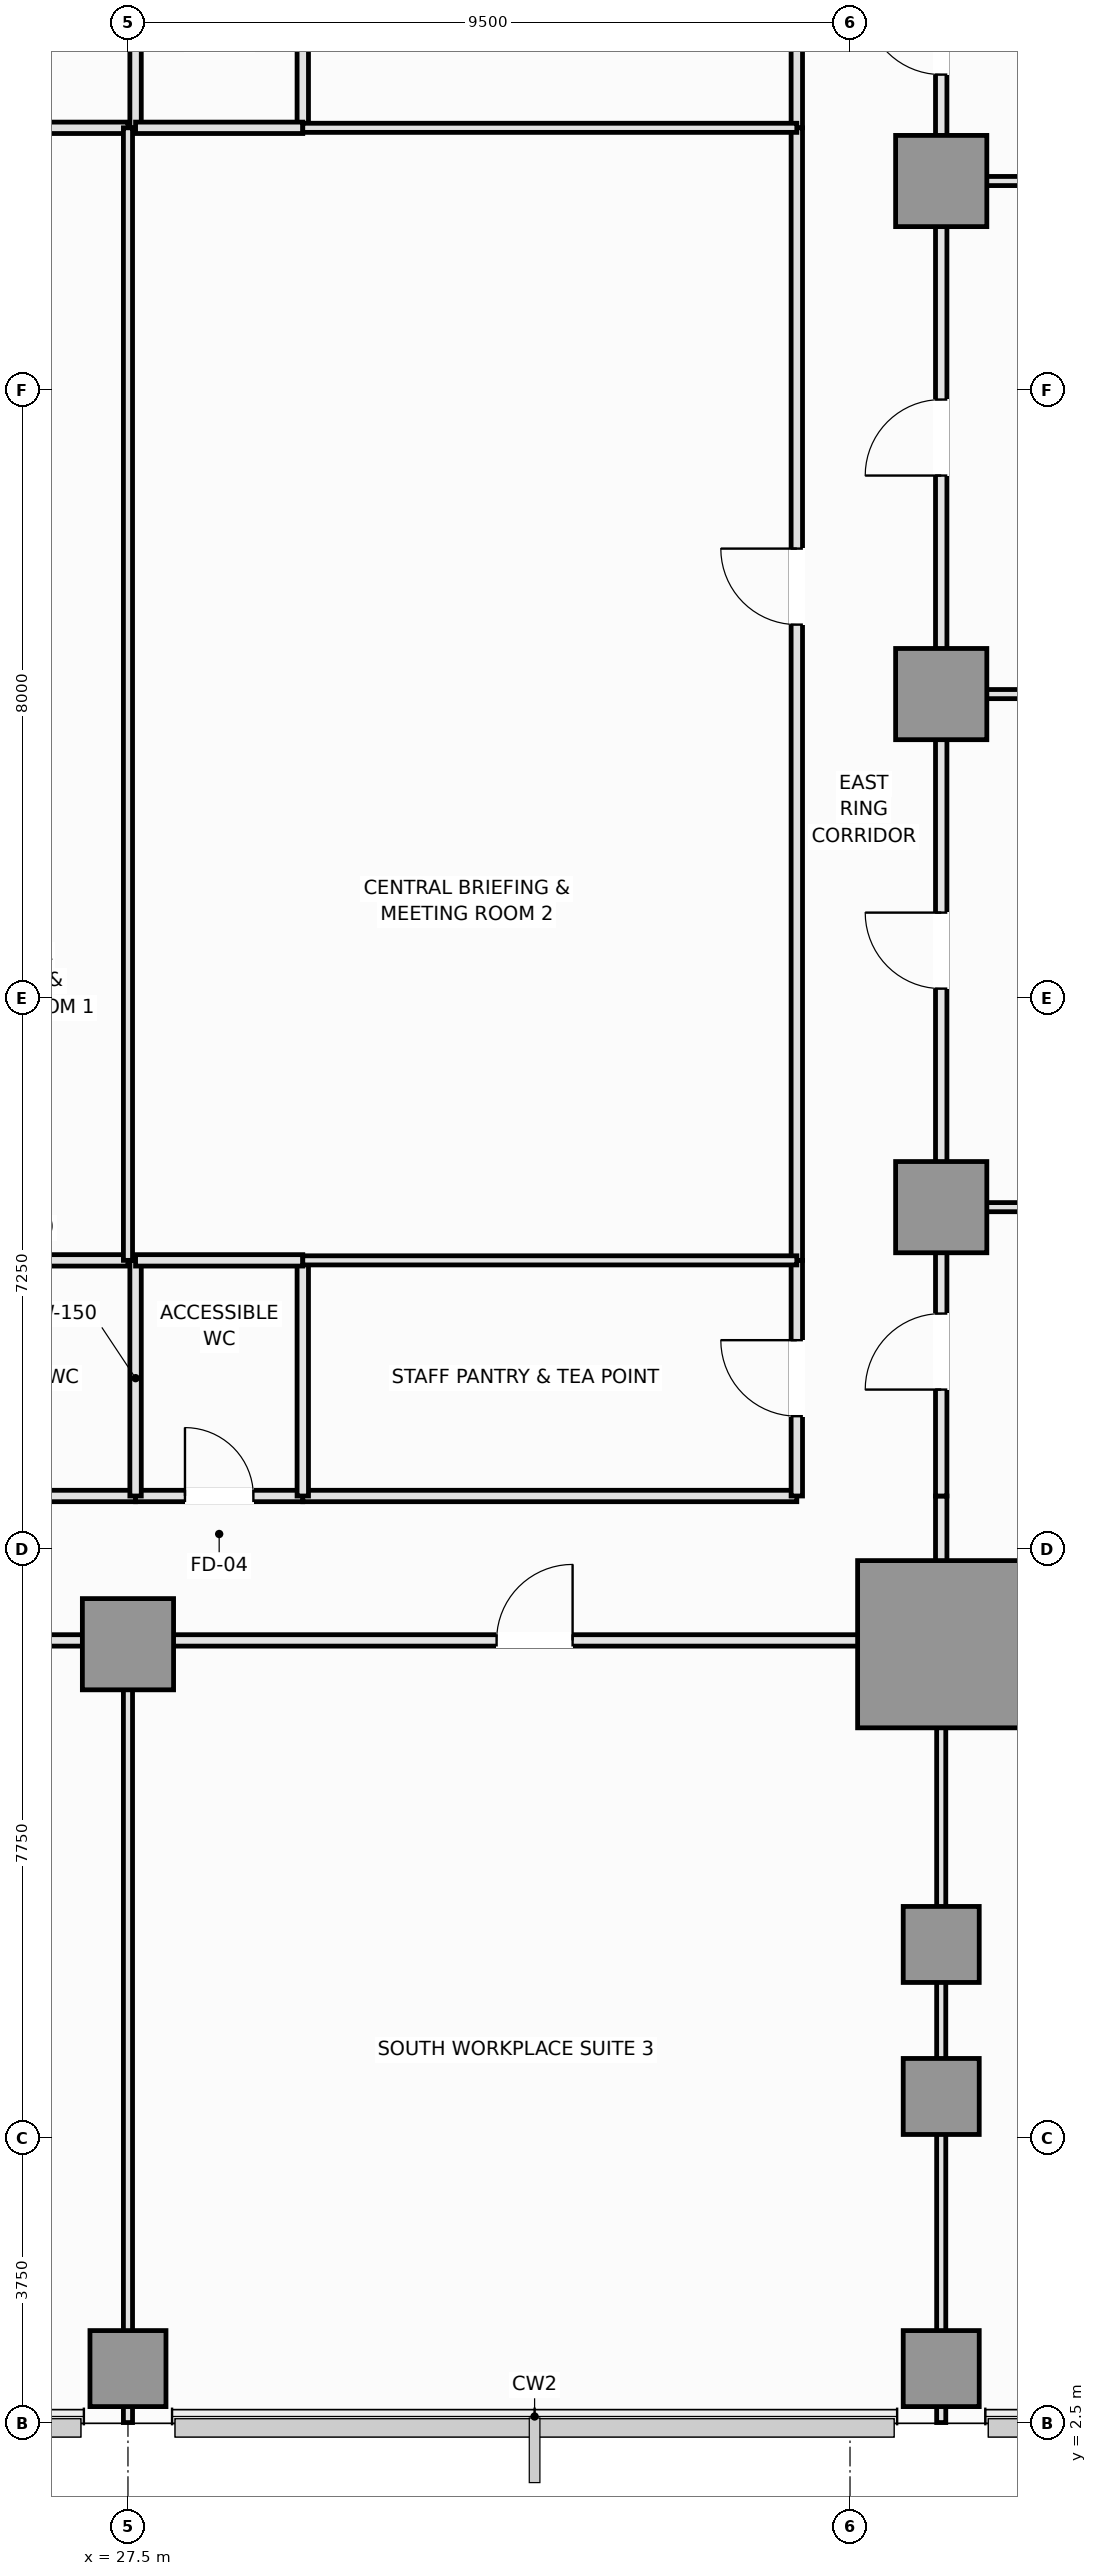
"""IFC4 building model, lengths in metres.
Left out: names, types, materials, properties, quantities, classifications, styles, units other than length and angle.
Written with IfcOpenShell. Run it as: python <this file> out.ifc"""

import sys

from ifc_helpers import new_model, si_unit, direction, frame, frame_2d, origin, origin_2d, place, context, subcontext, project, spatial, rectangle, extrude, element, fill, save


model = new_model("IFC4")
c1 = context("Model", 3, precision=1e-05, world=origin(), true_north=direction((0.0, 1.0)))
c2 = subcontext(c1, "Body", "Model", "MODEL_VIEW")
j1 = project(units=[si_unit("LENGTHUNIT", "METRE"), si_unit("PLANEANGLEUNIT", "RADIAN")], contexts=[c1])
p1 = place(None, origin())
s1 = spatial("IfcSite", under=j1, at=p1, CompositionType="ELEMENT")
p2 = place(p1, origin())
s2 = spatial("IfcBuilding", under=s1, at=p2, CompositionType="ELEMENT")
p3 = place(p2, frame((0.0, 0.0, 29.15)))
s3 = spatial("IfcBuildingStorey", under=s2, at=p3, CompositionType="ELEMENT", Elevation=29.15)
p4 = place(p3, frame((38.2, 12.75, 0.0), z_axis=(0.0, 0.0, 1.0), x_axis=(1.0, 0.0, 0.0)))
e1 = element("IfcColumn", 1, at=p4, inside=s3, PredefinedType="COLUMN", context=c2, shape_type="SweptSolid", body=[
    extrude(rectangle(XDim=2.2, YDim=2.2, at=origin_2d()), origin(), (0.0, 0.0, 1.0), 3.55),
])
for number, where, z_axis, x_axis in (
    (2, (27.5, 12.75, 0.0), (0.0, 0.0, 1.0), (1.0, 0.0, 0.0)),
    (3, (38.2, 18.5, 0.0), (0.0, 0.0, 1.0), (1.0, 0.0, 0.0)),
    (4, (38.2, 25.25, 0.0), (0.0, 0.0, 1.0), (1.0, 0.0, 0.0)),
    (5, (38.2, 32.0, 0.0), (0.0, 0.0, 1.0), (1.0, 0.0, 0.0)),
):
    element("IfcColumn", number, at=place(p3, frame(where, z_axis=z_axis, x_axis=x_axis)), inside=s3, PredefinedType="COLUMN", context=c2, shape_type="SweptSolid", body=[
        extrude(rectangle(XDim=1.2, YDim=1.2, at=origin_2d()), origin(), (0.0, 0.0, 1.0), 3.55),
    ])
for number, where, z_axis, x_axis in (
    (6, (38.2, 6.8, 0.0), (0.0, 0.0, 1.0), (1.0, 0.0, 0.0)),
    (7, (38.2, 8.8, 0.0), (0.0, 0.0, 1.0), (1.0, 0.0, 0.0)),
    (8, (27.5, 3.22, 0.0), (0.0, 0.0, 1.0), (1.0, 0.0, 0.0)),
    (9, (38.2, 3.22, 0.0), (0.0, 0.0, 1.0), (1.0, 0.0, 0.0)),
):
    element("IfcColumn", number, at=place(p3, frame(where, z_axis=z_axis, x_axis=x_axis)), inside=s3, PredefinedType="COLUMN", context=c2, shape_type="SweptSolid", body=[
        extrude(rectangle(XDim=1.0, YDim=1.0, at=origin_2d()), origin(), (0.0, 0.0, 1.0), 3.55),
    ])
p5 = place(p3, frame((24.45, 14.7, 0.0), z_axis=(0.0, 0.0, 1.0), x_axis=(1.0, 0.0, 0.0)))
e10 = element("IfcWall", 10, at=p5, inside=s3, PredefinedType="PLUMBINGWALL", context=c2, shape_type="SweptSolid", body=[
    extrude(rectangle(XDim=3.15, YDim=0.15, at=frame_2d((1.575, 0.0))), origin(), (0.0, 0.0, 1.0), 3.37),
])
p6 = place(p3, frame((27.6, 14.7, 0.0), z_axis=(0.0, 0.0, 1.0), x_axis=(1.0, 0.0, 0.0)))
e11 = element("IfcWall", 11, at=p6, inside=s3, PredefinedType="PLUMBINGWALL", context=c2, shape_type="SweptSolid", body=[
    extrude(rectangle(XDim=2.2, YDim=0.15, at=frame_2d((1.1, 0.0))), origin(), (0.0, 0.0, 1.0), 3.37),
])
p7 = place(p6, frame((0.65, 0.0, 0.0)))
e12 = element("IfcOpeningElement", 12, at=p7, cuts=e11, PredefinedType="OPENING", context=c2, shape_type="SweptSolid", body=[
    extrude(rectangle(XDim=0.9, YDim=2.1, at=frame_2d((0.45, 1.05))), frame((0.0, 0.085, 0.0), z_axis=(0.0, -1.0, 0.0), x_axis=(1.0, 0.0, 0.0)), (0.0, 0.0, 1.0), 0.17),
])
p8 = place(p3, frame((29.8, 14.7, 0.0), z_axis=(0.0, 0.0, 1.0), x_axis=(1.0, 0.0, 0.0)))
e13 = element("IfcWall", 13, at=p8, inside=s3, PredefinedType="PARTITIONING", context=c2, shape_type="SweptSolid", body=[
    extrude(rectangle(XDim=6.5, YDim=0.15, at=frame_2d((3.25, 0.0))), origin(), (0.0, 0.0, 1.0), 3.37),
])
p9 = place(p3, frame((19.9, 12.8, 0.0), z_axis=(0.0, 0.0, 1.0), x_axis=(1.0, 0.0, 0.0)))
e14 = element("IfcWall", 14, at=p9, inside=s3, PredefinedType="PARTITIONING", context=c2, shape_type="SweptSolid", body=[
    extrude(rectangle(XDim=7.6, YDim=0.15, at=frame_2d((3.8, 0.0))), origin(), (0.0, 0.0, 1.0), 2.72),
])
p10 = place(p9, frame((3.3, 0.0, 0.0)))
e15 = element("IfcOpeningElement", 15, at=p10, cuts=e14, PredefinedType="OPENING", context=c2, shape_type="SweptSolid", body=[
    extrude(rectangle(XDim=1.0, YDim=2.15, at=frame_2d((0.5, 1.075))), frame((0.0, 0.085, 0.0), z_axis=(0.0, -1.0, 0.0), x_axis=(1.0, 0.0, 0.0)), (0.0, 0.0, 1.0), 0.17),
])
p11 = place(p3, frame((27.5, 12.8, 0.0), z_axis=(0.0, 0.0, 1.0), x_axis=(1.0, 0.0, 0.0)))
e16 = element("IfcWall", 16, at=p11, inside=s3, PredefinedType="PARTITIONING", context=c2, shape_type="SweptSolid", body=[
    extrude(rectangle(XDim=10.7, YDim=0.15, at=frame_2d((5.35, 0.0))), origin(), (0.0, 0.0, 1.0), 2.72),
])
p12 = place(p11, frame((4.85, 0.0, 0.0)))
e17 = element("IfcOpeningElement", 17, at=p12, cuts=e16, PredefinedType="OPENING", context=c2, shape_type="SweptSolid", body=[
    extrude(rectangle(XDim=1.0, YDim=2.15, at=frame_2d((0.5, 1.075))), frame((0.0, 0.085, 0.0), z_axis=(0.0, -1.0, 0.0), x_axis=(1.0, 0.0, 0.0)), (0.0, 0.0, 1.0), 0.17),
])
p13 = place(p3, frame((38.2, 12.8, 0.0), z_axis=(0.0, 0.0, 1.0), x_axis=(0.0, 1.0, 0.0)))
e18 = element("IfcWall", 18, at=p13, inside=s3, PredefinedType="PARTITIONING", context=c2, shape_type="SweptSolid", body=[
    extrude(rectangle(XDim=1.9, YDim=0.15, at=frame_2d((0.95, 0.0))), origin(), (0.0, 0.0, 1.0), 2.82),
])
p14 = place(p3, frame((36.3, 14.7, 0.0), z_axis=(0.0, 0.0, 1.0), x_axis=(0.0, 1.0, 0.0)))
e19 = element("IfcWall", 19, at=p14, inside=s3, PredefinedType="PARTITIONING", context=c2, shape_type="SweptSolid", body=[
    extrude(rectangle(XDim=3.1, YDim=0.15, at=frame_2d((1.55, 0.0))), origin(), (0.0, 0.0, 1.0), 3.37),
])
p15 = place(p14, frame((1.05, 0.0, 0.0)))
e20 = element("IfcOpeningElement", 20, at=p15, cuts=e19, PredefinedType="OPENING", context=c2, shape_type="SweptSolid", body=[
    extrude(rectangle(XDim=1.0, YDim=2.15, at=frame_2d((0.5, 1.075))), frame((0.0, 0.085, 0.0), z_axis=(0.0, -1.0, 0.0), x_axis=(1.0, 0.0, 0.0)), (0.0, 0.0, 1.0), 0.17),
])
p16 = place(p3, frame((36.3, 32.7, 0.0), z_axis=(0.0, 0.0, 1.0), x_axis=(0.0, 1.0, 0.0)))
e21 = element("IfcWall", 21, at=p16, inside=s3, PredefinedType="PARTITIONING", context=c2, shape_type="SweptSolid", body=[
    extrude(rectangle(XDim=3.1, YDim=0.15, at=frame_2d((1.55, 0.0))), origin(), (0.0, 0.0, 1.0), 3.37),
])
p17 = place(p16, frame((1.05, 0.0, 0.0)))
e22 = element("IfcOpeningElement", 22, at=p17, cuts=e21, PredefinedType="OPENING", context=c2, shape_type="SweptSolid", body=[
    extrude(rectangle(XDim=1.0, YDim=2.15, at=frame_2d((0.5, 1.075))), frame((0.0, 0.085, 0.0), z_axis=(0.0, -1.0, 0.0), x_axis=(1.0, 0.0, 0.0)), (0.0, 0.0, 1.0), 0.17),
])
p18 = place(p3, frame((36.3, 17.8, 0.0), z_axis=(0.0, 0.0, 1.0), x_axis=(0.0, 1.0, 0.0)))
e23 = element("IfcWall", 23, at=p18, inside=s3, PredefinedType="PARTITIONING", context=c2, shape_type="SweptSolid", body=[
    extrude(rectangle(XDim=14.9, YDim=0.15, at=frame_2d((7.45, 0.0))), origin(), (0.0, 0.0, 1.0), 3.37),
])
p19 = place(p18, frame((8.364, 0.0, 0.0)))
e24 = element("IfcOpeningElement", 24, at=p19, cuts=e23, PredefinedType="OPENING", context=c2, shape_type="SweptSolid", body=[
    extrude(rectangle(XDim=1.0, YDim=2.15, at=frame_2d((0.5, 1.075))), frame((0.0, 0.085, 0.0), z_axis=(0.0, -1.0, 0.0), x_axis=(1.0, 0.0, 0.0)), (0.0, 0.0, 1.0), 0.17),
])
p20 = place(p3, frame((38.2, 14.7, 0.0), z_axis=(0.0, 0.0, 1.0), x_axis=(0.0, 1.0, 0.0)))
e25 = element("IfcWall", 25, at=p20, inside=s3, PredefinedType="PARTITIONING", context=c2, shape_type="SweptSolid", body=[
    extrude(rectangle(XDim=3.8, YDim=0.15, at=frame_2d((1.9, 0.0))), origin(), (0.0, 0.0, 1.0), 2.82),
])
p21 = place(p20, frame((1.4, 0.0, 0.0)))
e26 = element("IfcOpeningElement", 26, at=p21, cuts=e25, PredefinedType="OPENING", context=c2, shape_type="SweptSolid", body=[
    extrude(rectangle(XDim=1.0, YDim=2.15, at=frame_2d((0.5, 1.075))), frame((0.0, 0.085, 0.0), z_axis=(0.0, -1.0, 0.0), x_axis=(1.0, 0.0, 0.0)), (0.0, 0.0, 1.0), 0.17),
])
p22 = place(p3, frame((38.2, 18.5, 0.0), z_axis=(0.0, 0.0, 1.0), x_axis=(0.0, 1.0, 0.0)))
e27 = element("IfcWall", 27, at=p22, inside=s3, PredefinedType="PARTITIONING", context=c2, shape_type="SweptSolid", body=[
    extrude(rectangle(XDim=6.75, YDim=0.15, at=frame_2d((3.375, 0.0))), origin(), (0.0, 0.0, 1.0), 2.82),
])
p23 = place(p22, frame((2.875, 0.0, 0.0)))
e28 = element("IfcOpeningElement", 28, at=p23, cuts=e27, PredefinedType="OPENING", context=c2, shape_type="SweptSolid", body=[
    extrude(rectangle(XDim=1.0, YDim=2.15, at=frame_2d((0.5, 1.075))), frame((0.0, 0.085, 0.0), z_axis=(0.0, -1.0, 0.0), x_axis=(1.0, 0.0, 0.0)), (0.0, 0.0, 1.0), 0.17),
])
p24 = place(p3, frame((38.2, 25.25, 0.0), z_axis=(0.0, 0.0, 1.0), x_axis=(0.0, 1.0, 0.0)))
e29 = element("IfcWall", 29, at=p24, inside=s3, PredefinedType="PARTITIONING", context=c2, shape_type="SweptSolid", body=[
    extrude(rectangle(XDim=6.75, YDim=0.15, at=frame_2d((3.375, 0.0))), origin(), (0.0, 0.0, 1.0), 2.82),
])
p25 = place(p24, frame((2.875, 0.0, 0.0)))
e30 = element("IfcOpeningElement", 30, at=p25, cuts=e29, PredefinedType="OPENING", context=c2, shape_type="SweptSolid", body=[
    extrude(rectangle(XDim=1.0, YDim=2.15, at=frame_2d((0.5, 1.075))), frame((0.0, 0.085, 0.0), z_axis=(0.0, -1.0, 0.0), x_axis=(1.0, 0.0, 0.0)), (0.0, 0.0, 1.0), 0.17),
])
p26 = place(p3, frame((38.2, 32.0, 0.0), z_axis=(0.0, 0.0, 1.0), x_axis=(0.0, 1.0, 0.0)))
e31 = element("IfcWall", 31, at=p26, inside=s3, PredefinedType="PARTITIONING", context=c2, shape_type="SweptSolid", body=[
    extrude(rectangle(XDim=3.8, YDim=0.15, at=frame_2d((1.9, 0.0))), origin(), (0.0, 0.0, 1.0), 2.82),
])
p27 = place(p26, frame((1.4, 0.0, 0.0)))
e32 = element("IfcOpeningElement", 32, at=p27, cuts=e31, PredefinedType="OPENING", context=c2, shape_type="SweptSolid", body=[
    extrude(rectangle(XDim=1.0, YDim=2.15, at=frame_2d((0.5, 1.075))), frame((0.0, 0.085, 0.0), z_axis=(0.0, -1.0, 0.0), x_axis=(1.0, 0.0, 0.0)), (0.0, 0.0, 1.0), 0.17),
])
p28 = place(p3, frame((27.6, 14.7, 0.0), z_axis=(0.0, 0.0, 1.0), x_axis=(0.0, 1.0, 0.0)))
e33 = element("IfcWall", 33, at=p28, inside=s3, PredefinedType="PLUMBINGWALL", context=c2, shape_type="SweptSolid", body=[
    extrude(rectangle(XDim=3.1, YDim=0.15, at=frame_2d((1.55, 0.0))), origin(), (0.0, 0.0, 1.0), 3.37),
])
p29 = place(p3, frame((24.45, 17.8, 0.0), z_axis=(0.0, 0.0, 1.0), x_axis=(1.0, 0.0, 0.0)))
e34 = element("IfcWall", 34, at=p29, inside=s3, PredefinedType="PLUMBINGWALL", context=c2, shape_type="SweptSolid", body=[
    extrude(rectangle(XDim=3.05, YDim=0.15, at=frame_2d((1.525, 0.0))), origin(), (0.0, 0.0, 1.0), 3.37),
])
p30 = place(p3, frame((27.6, 32.7, 0.0), z_axis=(0.0, 0.0, 1.0), x_axis=(0.0, 1.0, 0.0)))
e35 = element("IfcWall", 35, at=p30, inside=s3, PredefinedType="PLUMBINGWALL", context=c2, shape_type="SweptSolid", body=[
    extrude(rectangle(XDim=3.1, YDim=0.15, at=frame_2d((1.55, 0.0))), origin(), (0.0, 0.0, 1.0), 3.37),
])
p31 = place(p3, frame((24.45, 32.7, 0.0), z_axis=(0.0, 0.0, 1.0), x_axis=(1.0, 0.0, 0.0)))
e36 = element("IfcWall", 36, at=p31, inside=s3, PredefinedType="PLUMBINGWALL", context=c2, shape_type="SweptSolid", body=[
    extrude(rectangle(XDim=3.05, YDim=0.15, at=frame_2d((1.525, 0.0))), origin(), (0.0, 0.0, 1.0), 3.37),
])
p32 = place(p3, frame((29.8, 14.7, 0.0), z_axis=(0.0, 0.0, 1.0), x_axis=(0.0, 1.0, 0.0)))
e37 = element("IfcWall", 37, at=p32, inside=s3, PredefinedType="PLUMBINGWALL", context=c2, shape_type="SweptSolid", body=[
    extrude(rectangle(XDim=3.1, YDim=0.15, at=frame_2d((1.55, 0.0))), origin(), (0.0, 0.0, 1.0), 3.37),
])
p33 = place(p3, frame((27.6, 17.8, 0.0), z_axis=(0.0, 0.0, 1.0), x_axis=(1.0, 0.0, 0.0)))
e38 = element("IfcWall", 38, at=p33, inside=s3, PredefinedType="PLUMBINGWALL", context=c2, shape_type="SweptSolid", body=[
    extrude(rectangle(XDim=2.2, YDim=0.15, at=frame_2d((1.1, 0.0))), origin(), (0.0, 0.0, 1.0), 3.37),
])
p34 = place(p3, frame((29.8, 32.7, 0.0), z_axis=(0.0, 0.0, 1.0), x_axis=(0.0, 1.0, 0.0)))
e39 = element("IfcWall", 39, at=p34, inside=s3, PredefinedType="PLUMBINGWALL", context=c2, shape_type="SweptSolid", body=[
    extrude(rectangle(XDim=3.1, YDim=0.15, at=frame_2d((1.55, 0.0))), origin(), (0.0, 0.0, 1.0), 3.37),
])
p35 = place(p3, frame((27.6, 32.7, 0.0), z_axis=(0.0, 0.0, 1.0), x_axis=(1.0, 0.0, 0.0)))
e40 = element("IfcWall", 40, at=p35, inside=s3, PredefinedType="PLUMBINGWALL", context=c2, shape_type="SweptSolid", body=[
    extrude(rectangle(XDim=2.2, YDim=0.15, at=frame_2d((1.1, 0.0))), origin(), (0.0, 0.0, 1.0), 3.37),
])
for number, where, z_axis, x_axis in (
    (41, (29.8, 17.8, 0.0), (0.0, 0.0, 1.0), (1.0, 0.0, 0.0)),
    (42, (29.8, 32.7, 0.0), (0.0, 0.0, 1.0), (1.0, 0.0, 0.0)),
):
    element("IfcWall", number, at=place(p3, frame(where, z_axis=z_axis, x_axis=x_axis)), inside=s3, PredefinedType="PARTITIONING", context=c2, shape_type="SweptSolid", body=[
        extrude(rectangle(XDim=6.5, YDim=0.12, at=frame_2d((3.25, 0.0))), origin(), (0.0, 0.0, 1.0), 3.37),
    ])
p36 = place(p3, frame((27.5, 17.8, 0.0), z_axis=(0.0, 0.0, 1.0), x_axis=(0.0, 1.0, 0.0)))
e43 = element("IfcWall", 43, at=p36, inside=s3, PredefinedType="PARTITIONING", context=c2, shape_type="SweptSolid", body=[
    extrude(rectangle(XDim=14.9, YDim=0.12, at=frame_2d((7.45, 0.0))), origin(), (0.0, 0.0, 1.0), 3.37),
])
for number, where, z_axis, x_axis in (
    (44, (27.5, 2.51, 0.0), (0.0, 0.0, 1.0), (0.0, 1.0, 0.0)),
    (45, (38.2, 2.51, 0.0), (0.0, 0.0, 1.0), (0.0, 1.0, 0.0)),
):
    element("IfcWall", number, at=place(p3, frame(where, z_axis=z_axis, x_axis=x_axis)), inside=s3, PredefinedType="PARTITIONING", context=c2, shape_type="SweptSolid", body=[
        extrude(rectangle(XDim=10.29, YDim=0.12, at=frame_2d((5.145, 0.0))), origin(), (0.0, 0.0, 1.0), 2.82),
    ])
for number, where, z_axis, x_axis in (
    (46, (38.2, 18.5, 0.0), (0.0, 0.0, 1.0), (1.0, 0.0, 0.0)),
    (47, (38.2, 25.25, 0.0), (0.0, 0.0, 1.0), (1.0, 0.0, 0.0)),
    (48, (38.2, 32.0, 0.0), (0.0, 0.0, 1.0), (1.0, 0.0, 0.0)),
):
    element("IfcWall", number, at=place(p3, frame(where, z_axis=z_axis, x_axis=x_axis)), inside=s3, PredefinedType="PARTITIONING", context=c2, shape_type="SweptSolid", body=[
        extrude(rectangle(XDim=15.29, YDim=0.12, at=frame_2d((7.645, 0.0))), origin(), (0.0, 0.0, 1.0), 2.72),
    ])
p37 = place(p7, origin())
e49 = element("IfcDoor", 49, at=p37, inside=s3, OperationType="SINGLE_SWING_LEFT", PredefinedType="DOOR", context=c2, shape_type="SweptSolid", body=[
    extrude(rectangle(XDim=0.9, YDim=2.1, at=frame_2d((0.45, 1.05))), frame((0.0, 0.025, 0.0), z_axis=(0.0, -1.0, 0.0), x_axis=(1.0, 0.0, 0.0)), (0.0, 0.0, 1.0), 0.05),
])
fill(e12, e49)
p38 = place(p12, origin())
e50 = element("IfcDoor", 50, at=p38, inside=s3, OperationType="SINGLE_SWING_RIGHT", PredefinedType="DOOR", context=c2, shape_type="SweptSolid", body=[
    extrude(rectangle(XDim=1.0, YDim=2.15, at=frame_2d((0.5, 1.075))), frame((0.0, 0.025, 0.0), z_axis=(0.0, -1.0, 0.0), x_axis=(1.0, 0.0, 0.0)), (0.0, 0.0, 1.0), 0.05),
])
fill(e17, e50)
p39 = place(p15, origin())
e51 = element("IfcDoor", 51, at=p39, inside=s3, OperationType="SINGLE_SWING_RIGHT", PredefinedType="DOOR", context=c2, shape_type="SweptSolid", body=[
    extrude(rectangle(XDim=1.0, YDim=2.15, at=frame_2d((0.5, 1.075))), frame((0.0, 0.025, 0.0), z_axis=(0.0, -1.0, 0.0), x_axis=(1.0, 0.0, 0.0)), (0.0, 0.0, 1.0), 0.05),
])
fill(e20, e51)
p40 = place(p19, origin())
e52 = element("IfcDoor", 52, at=p40, inside=s3, OperationType="SINGLE_SWING_RIGHT", PredefinedType="DOOR", context=c2, shape_type="SweptSolid", body=[
    extrude(rectangle(XDim=1.0, YDim=2.15, at=frame_2d((0.5, 1.075))), frame((0.0, 0.025, 0.0), z_axis=(0.0, -1.0, 0.0), x_axis=(1.0, 0.0, 0.0)), (0.0, 0.0, 1.0), 0.05),
])
fill(e24, e52)
p41 = place(p21, origin())
e53 = element("IfcDoor", 53, at=p41, inside=s3, OperationType="SINGLE_SWING_LEFT", PredefinedType="DOOR", context=c2, shape_type="SweptSolid", body=[
    extrude(rectangle(XDim=1.0, YDim=2.15, at=frame_2d((0.5, 1.075))), frame((0.0, 0.025, 0.0), z_axis=(0.0, -1.0, 0.0), x_axis=(1.0, 0.0, 0.0)), (0.0, 0.0, 1.0), 0.05),
])
fill(e26, e53)
p42 = place(p23, origin())
e54 = element("IfcDoor", 54, at=p42, inside=s3, OperationType="SINGLE_SWING_RIGHT", PredefinedType="DOOR", context=c2, shape_type="SweptSolid", body=[
    extrude(rectangle(XDim=1.0, YDim=2.15, at=frame_2d((0.5, 1.075))), frame((0.0, 0.025, 0.0), z_axis=(0.0, -1.0, 0.0), x_axis=(1.0, 0.0, 0.0)), (0.0, 0.0, 1.0), 0.05),
])
fill(e28, e54)
p43 = place(p25, origin())
e55 = element("IfcDoor", 55, at=p43, inside=s3, OperationType="SINGLE_SWING_LEFT", PredefinedType="DOOR", context=c2, shape_type="SweptSolid", body=[
    extrude(rectangle(XDim=1.0, YDim=2.15, at=frame_2d((0.5, 1.075))), frame((0.0, 0.025, 0.0), z_axis=(0.0, -1.0, 0.0), x_axis=(1.0, 0.0, 0.0)), (0.0, 0.0, 1.0), 0.05),
])
fill(e30, e55)
p44 = place(p27, origin())
e56 = element("IfcDoor", 56, at=p44, inside=s3, OperationType="SINGLE_SWING_RIGHT", PredefinedType="DOOR", context=c2, shape_type="SweptSolid", body=[
    extrude(rectangle(XDim=1.0, YDim=2.15, at=frame_2d((0.5, 1.075))), frame((0.0, 0.025, 0.0), z_axis=(0.0, -1.0, 0.0), x_axis=(1.0, 0.0, 0.0)), (0.0, 0.0, 1.0), 0.05),
])
fill(e32, e56)
save(model, sys.argv[1])
